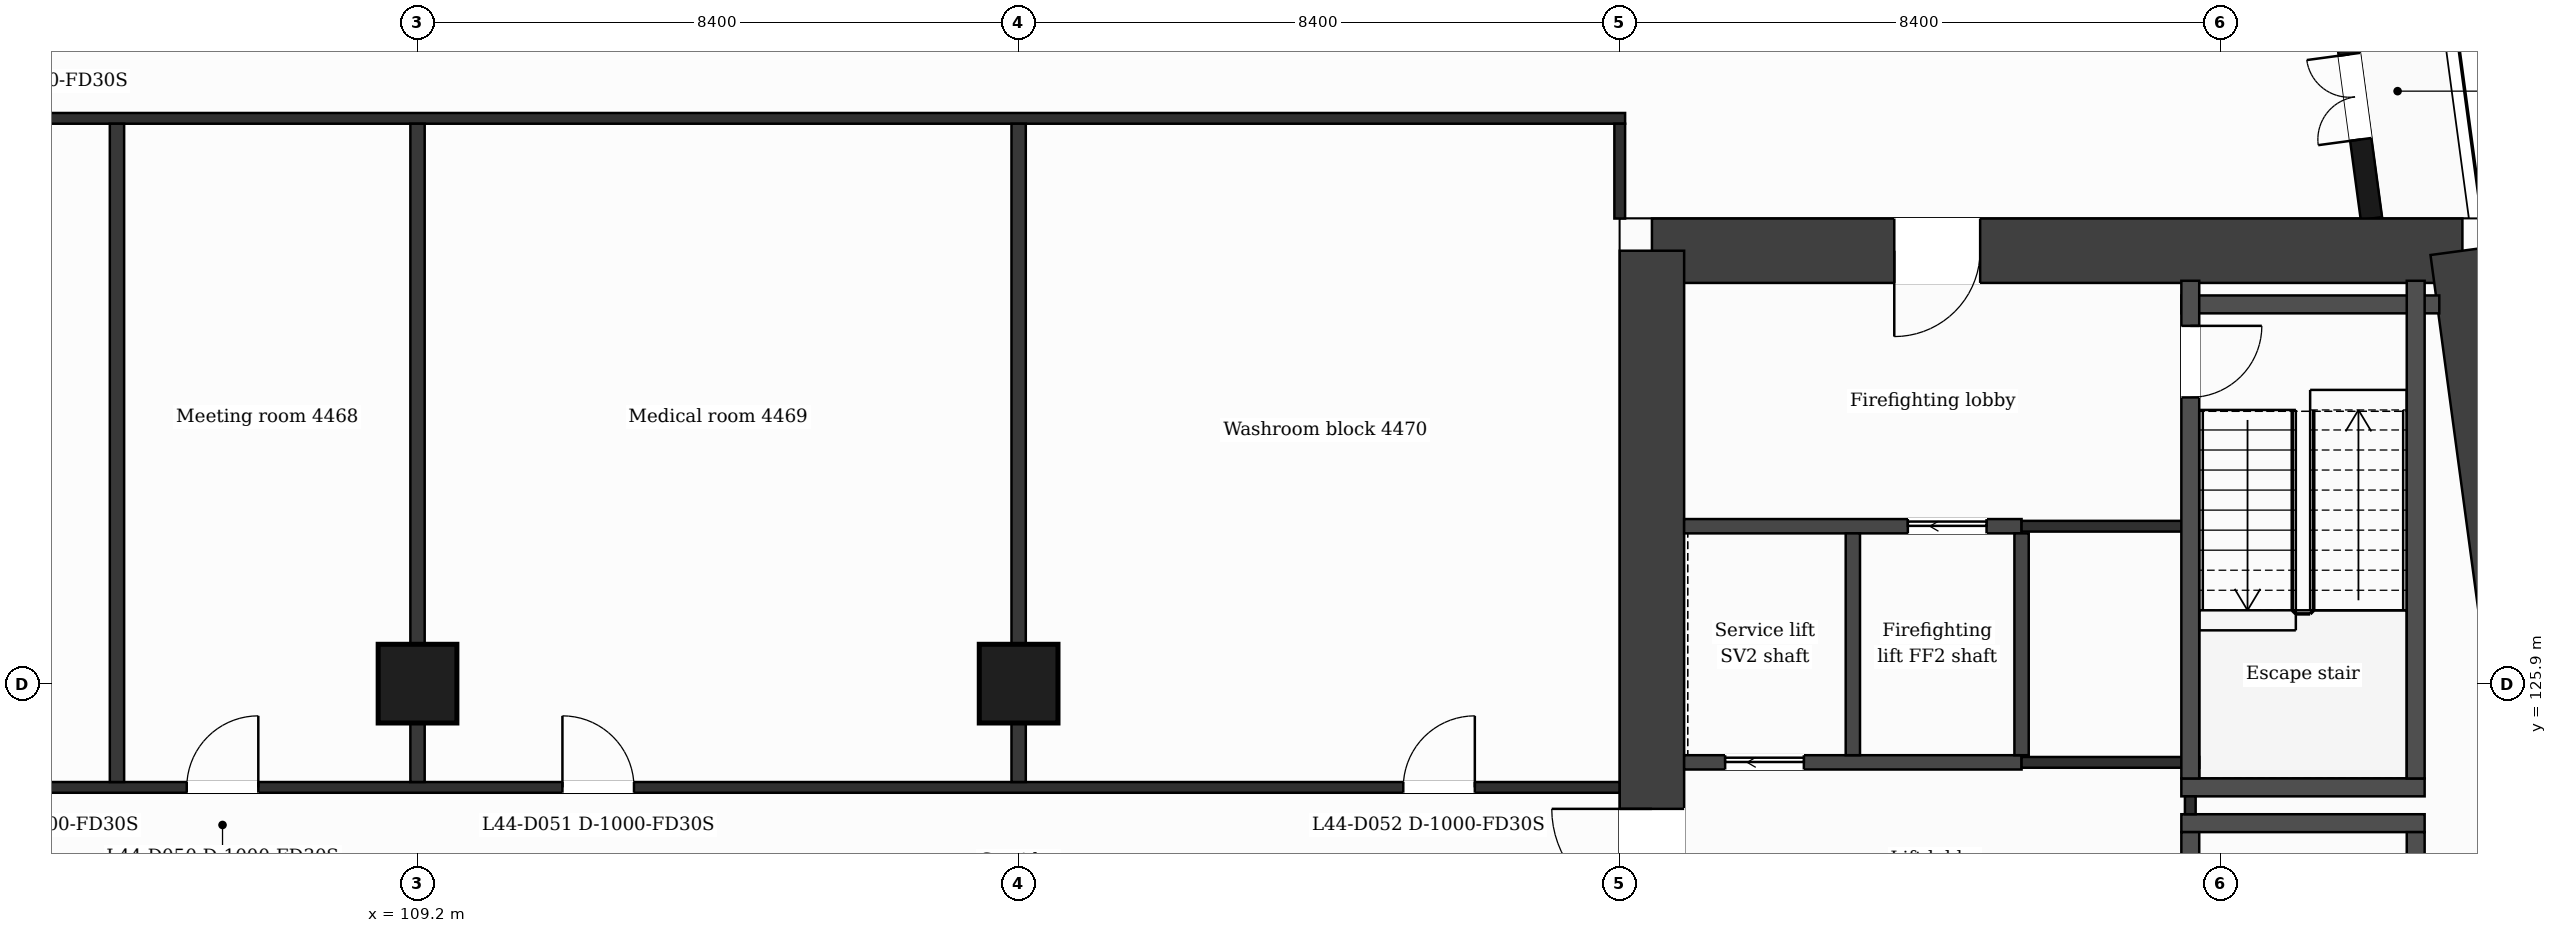
"""IFC4 building model, lengths in metres.
Left out: names, types, materials, properties, quantities, classifications, styles, units other than length and angle.
Written with IfcOpenShell. Run it as: python <this file> out.ifc"""

import sys

from ifc_helpers import new_model, si_unit, direction, frame, frame_2d, origin, origin_2d, place, context, subcontext, project, spatial, rectangle, extrude, element, fill, save


model = new_model("IFC4")
c1 = context("Model", 3, precision=1e-05, world=origin(), true_north=direction((0.0, 1.0)))
c2 = subcontext(c1, "Body", "Model", "MODEL_VIEW")
j1 = project(units=[si_unit("LENGTHUNIT", "METRE"), si_unit("PLANEANGLEUNIT", "RADIAN")], contexts=[c1])
p1 = place(None, origin())
s1 = spatial("IfcSite", under=j1, at=p1, CompositionType="ELEMENT")
p2 = place(p1, origin())
s2 = spatial("IfcBuilding", under=s1, at=p2, CompositionType="ELEMENT")
p3 = place(p2, frame((0.0, 0.0, 184.8)))
s3 = spatial("IfcBuildingStorey", under=s2, at=p3, CompositionType="ELEMENT", Elevation=184.8)
p4 = place(p3, frame((126.45, 131.95, 0.0), z_axis=(0.0, 0.0, 1.0), x_axis=(1.0, 0.0, 0.0)))
e1 = element("IfcWall", 1, at=p4, inside=s3, PredefinedType="SHEAR", context=c2, shape_type="SweptSolid", body=[
    extrude(rectangle(XDim=11.326, YDim=0.9, at=frame_2d((5.663, 0.0))), origin(), (0.0, 0.0, 1.0), 3.7),
])
p5 = place(p4, frame((3.386, 0.0, 0.0)))
e2 = element("IfcOpeningElement", 2, at=p5, cuts=e1, PredefinedType="OPENING", context=c2, shape_type="SweptSolid", body=[
    extrude(rectangle(XDim=1.2, YDim=2.1, at=frame_2d((0.6, 1.05))), frame((0.0, 0.46, 0.0), z_axis=(0.0, -1.0, 0.0), x_axis=(1.0, 0.0, 0.0)), (0.0, 0.0, 1.0), 0.92),
])
p6 = place(p3, frame((137.776, 131.95, 0.0), z_axis=(0.0, 0.0, 1.0), x_axis=(0.133421759112, -0.991059349482, 0.0)))
e3 = element("IfcWall", 3, at=p6, inside=s3, PredefinedType="SHEAR", context=c2, shape_type="SweptSolid", body=[
    extrude(rectangle(XDim=21.29, YDim=0.9, at=frame_2d((10.645, 0.0))), origin(), (0.0, 0.0, 1.0), 3.7),
])
p7 = place(p3, frame((126.45, 110.85, 0.0), z_axis=(0.0, 0.0, 1.0), x_axis=(0.0, 1.0, 0.0)))
e4 = element("IfcWall", 4, at=p7, inside=s3, PredefinedType="SHEAR", context=c2, shape_type="SweptSolid", body=[
    extrude(rectangle(XDim=21.1, YDim=0.9, at=frame_2d((10.55, 0.0))), origin(), (0.0, 0.0, 1.0), 3.7),
])
p8 = place(p7, frame((11.9, 0.0, 0.0)))
e5 = element("IfcOpeningElement", 5, at=p8, cuts=e4, PredefinedType="OPENING", context=c2, shape_type="SweptSolid", body=[
    extrude(rectangle(XDim=1.4, YDim=2.1, at=frame_2d((0.7, 1.05))), frame((0.0, 0.46, 0.0), z_axis=(0.0, -1.0, 0.0), x_axis=(1.0, 0.0, 0.0)), (0.0, 0.0, 1.0), 0.92),
])
for number, where, z_axis, x_axis in (
    (6, (109.2, 125.9, 0.0), (0.0, 0.0, 1.0), (1.0, 0.0, 0.0)),
    (7, (117.6, 125.9, 0.0), (0.0, 0.0, 1.0), (1.0, 0.0, 0.0)),
):
    element("IfcColumn", number, at=place(p3, frame(where, z_axis=z_axis, x_axis=x_axis)), inside=s3, PredefinedType="COLUMN", context=c2, shape_type="SweptSolid", body=[
        extrude(rectangle(XDim=1.1, YDim=1.1, at=origin_2d()), origin(), (0.0, 0.0, 1.0), 3.7),
    ])
p9 = place(p3, frame((136.504, 132.4, 0.0), z_axis=(0.0, 0.0, 1.0), x_axis=(-0.133399697462, 0.99106231929, 0.0)))
e8 = element("IfcWall", 8, at=p9, inside=s3, PredefinedType="SOLIDWALL", context=c2, shape_type="SweptSolid", body=[
    extrude(rectangle(XDim=6.74, YDim=0.3, at=frame_2d((3.37, 0.0))), origin(), (0.0, 0.0, 1.0), 3.38),
])
p10 = place(p9, frame((1.115, 0.0, 0.0)))
e9 = element("IfcOpeningElement", 9, at=p10, cuts=e8, PredefinedType="OPENING", context=c2, shape_type="SweptSolid", body=[
    extrude(rectangle(XDim=1.2, YDim=2.4, at=frame_2d((0.6, 1.2))), frame((0.0, 0.16, 0.0), z_axis=(0.0, -1.0, 0.0), x_axis=(1.0, 0.0, 0.0)), (0.0, 0.0, 1.0), 0.32),
])
p11 = place(p9, frame((3.835, 0.0, 0.9)))
e10 = element("IfcOpeningElement", 10, at=p11, cuts=e8, PredefinedType="OPENING", context=c2, shape_type="SweptSolid", body=[
    extrude(rectangle(XDim=2.4, YDim=2.1, at=frame_2d((1.2, 1.05))), frame((0.0, 0.16, 0.0), z_axis=(0.0, -1.0, 0.0), x_axis=(1.0, 0.0, 0.0)), (0.0, 0.0, 1.0), 0.32),
])
for number, where, z_axis, x_axis in (
    (11, (133.848, 123.95, 0.0), (0.0, 0.0, 1.0), (1.0, 0.0, 0.0)),
    (12, (133.848, 124.45, 0.0), (0.0, 0.0, 1.0), (1.0, 0.0, 0.0)),
):
    element("IfcWall", number, at=place(p3, frame(where, z_axis=z_axis, x_axis=x_axis)), inside=s3, PredefinedType="PARTITIONING", context=c2, shape_type="SweptSolid", body=[
        extrude(rectangle(XDim=3.4, YDim=0.25, at=frame_2d((1.7, 0.0))), origin(), (0.0, 0.0, 1.0), 3.38),
    ])
p12 = place(p3, frame((100.8, 124.45, 0.0), z_axis=(0.0, 0.0, 1.0), x_axis=(1.0, 0.0, 0.0)))
e13 = element("IfcWall", 13, at=p12, inside=s3, PredefinedType="PARTITIONING", context=c2, shape_type="SweptSolid", body=[
    extrude(rectangle(XDim=25.2, YDim=0.15, at=frame_2d((12.6, 0.0))), origin(), (0.0, 0.0, 1.0), 3.38),
])
p13 = place(p12, frame((0.675, 0.0, 0.0)))
e14 = element("IfcOpeningElement", 14, at=p13, cuts=e13, PredefinedType="OPENING", context=c2, shape_type="SweptSolid", body=[
    extrude(rectangle(XDim=1.0, YDim=2.1, at=frame_2d((0.5, 1.05))), frame((0.0, 0.085, 0.0), z_axis=(0.0, -1.0, 0.0), x_axis=(1.0, 0.0, 0.0)), (0.0, 0.0, 1.0), 0.17),
])
p14 = place(p12, frame((5.175, 0.0, 0.0)))
e15 = element("IfcOpeningElement", 15, at=p14, cuts=e13, PredefinedType="OPENING", context=c2, shape_type="SweptSolid", body=[
    extrude(rectangle(XDim=1.0, YDim=2.1, at=frame_2d((0.5, 1.05))), frame((0.0, 0.085, 0.0), z_axis=(0.0, -1.0, 0.0), x_axis=(1.0, 0.0, 0.0)), (0.0, 0.0, 1.0), 0.17),
])
p15 = place(p12, frame((10.425, 0.0, 0.0)))
e16 = element("IfcOpeningElement", 16, at=p15, cuts=e13, PredefinedType="OPENING", context=c2, shape_type="SweptSolid", body=[
    extrude(rectangle(XDim=1.0, YDim=2.1, at=frame_2d((0.5, 1.05))), frame((0.0, 0.085, 0.0), z_axis=(0.0, -1.0, 0.0), x_axis=(1.0, 0.0, 0.0)), (0.0, 0.0, 1.0), 0.17),
])
p16 = place(p12, frame((22.175, 0.0, 0.0)))
e17 = element("IfcOpeningElement", 17, at=p16, cuts=e13, PredefinedType="OPENING", context=c2, shape_type="SweptSolid", body=[
    extrude(rectangle(XDim=1.0, YDim=2.1, at=frame_2d((0.5, 1.05))), frame((0.0, 0.085, 0.0), z_axis=(0.0, -1.0, 0.0), x_axis=(1.0, 0.0, 0.0)), (0.0, 0.0, 1.0), 0.17),
])
p17 = place(p3, frame((126.9, 124.8, 0.0), z_axis=(0.0, 0.0, 1.0), x_axis=(1.0, 0.0, 0.0)))
e18 = element("IfcWall", 18, at=p17, inside=s3, PredefinedType="PARTITIONING", context=c2, shape_type="SweptSolid", body=[
    extrude(rectangle(XDim=4.715, YDim=0.2, at=frame_2d((2.358, 0.0))), origin(), (0.0, 0.0, 1.0), 3.38),
])
p18 = place(p17, frame((0.573, 0.0, 0.0)))
e19 = element("IfcOpeningElement", 19, at=p18, cuts=e18, PredefinedType="OPENING", context=c2, shape_type="SweptSolid", body=[
    extrude(rectangle(XDim=1.1, YDim=2.1, at=frame_2d((0.55, 1.05))), frame((0.0, 0.11, 0.0), z_axis=(0.0, -1.0, 0.0), x_axis=(1.0, 0.0, 0.0)), (0.0, 0.0, 1.0), 0.22),
])
p19 = place(p3, frame((131.615, 124.8, 0.0), z_axis=(0.0, 0.0, 1.0), x_axis=(1.0, 0.0, 0.0)))
e20 = element("IfcWall", 20, at=p19, inside=s3, PredefinedType="PARTITIONING", context=c2, shape_type="SweptSolid", body=[
    extrude(rectangle(XDim=2.483, YDim=0.15, at=frame_2d((1.241, 0.0))), origin(), (0.0, 0.0, 1.0), 3.38),
])
p20 = place(p3, frame((126.9, 128.1, 0.0), z_axis=(0.0, 0.0, 1.0), x_axis=(1.0, 0.0, 0.0)))
e21 = element("IfcWall", 21, at=p20, inside=s3, PredefinedType="PARTITIONING", context=c2, shape_type="SweptSolid", body=[
    extrude(rectangle(XDim=4.715, YDim=0.2, at=frame_2d((2.358, 0.0))), origin(), (0.0, 0.0, 1.0), 3.38),
])
p21 = place(p20, frame((3.126, 0.0, 0.0)))
e22 = element("IfcOpeningElement", 22, at=p21, cuts=e21, PredefinedType="OPENING", context=c2, shape_type="SweptSolid", body=[
    extrude(rectangle(XDim=1.1, YDim=2.1, at=frame_2d((0.55, 1.05))), frame((0.0, 0.11, 0.0), z_axis=(0.0, -1.0, 0.0), x_axis=(1.0, 0.0, 0.0)), (0.0, 0.0, 1.0), 0.22),
])
p22 = place(p3, frame((131.615, 128.1, 0.0), z_axis=(0.0, 0.0, 1.0), x_axis=(1.0, 0.0, 0.0)))
e23 = element("IfcWall", 23, at=p22, inside=s3, PredefinedType="PARTITIONING", context=c2, shape_type="SweptSolid", body=[
    extrude(rectangle(XDim=2.358, YDim=0.15, at=frame_2d((1.179, 0.0))), origin(), (0.0, 0.0, 1.0), 3.38),
])
p23 = place(p3, frame((133.848, 131.2, 0.0), z_axis=(0.0, 0.0, 1.0), x_axis=(1.0, 0.0, 0.0)))
e24 = element("IfcWall", 24, at=p23, inside=s3, PredefinedType="PARTITIONING", context=c2, shape_type="SweptSolid", body=[
    extrude(rectangle(XDim=3.605, YDim=0.25, at=frame_2d((1.802, 0.0))), origin(), (0.0, 0.0, 1.0), 3.38),
])
p24 = place(p3, frame((100.725, 133.8, 0.0), z_axis=(0.0, 0.0, 1.0), x_axis=(1.0, 0.0, 0.0)))
e25 = element("IfcWall", 25, at=p24, inside=s3, PredefinedType="PARTITIONING", context=c2, shape_type="SweptSolid", body=[
    extrude(rectangle(XDim=25.35, YDim=0.15, at=frame_2d((12.675, 0.0))), origin(), (0.0, 0.0, 1.0), 3.38),
])
p25 = place(p24, frame((2.3, 0.0, 0.0)))
e26 = element("IfcOpeningElement", 26, at=p25, cuts=e25, PredefinedType="OPENING", context=c2, shape_type="SweptSolid", body=[
    extrude(rectangle(XDim=1.0, YDim=2.1, at=frame_2d((0.5, 1.05))), frame((0.0, 0.085, 0.0), z_axis=(0.0, -1.0, 0.0), x_axis=(1.0, 0.0, 0.0)), (0.0, 0.0, 1.0), 0.17),
])
for number, where, z_axis, x_axis in (
    (27, (105.0, 124.525, 0.0), (0.0, 0.0, 1.0), (0.0, 1.0, 0.0)),
    (28, (109.2, 124.525, 0.0), (0.0, 0.0, 1.0), (0.0, 1.0, 0.0)),
    (29, (117.6, 124.525, 0.0), (0.0, 0.0, 1.0), (0.0, 1.0, 0.0)),
):
    element("IfcWall", number, at=place(p3, frame(where, z_axis=z_axis, x_axis=x_axis)), inside=s3, PredefinedType="PARTITIONING", context=c2, shape_type="SweptSolid", body=[
        extrude(rectangle(XDim=9.2, YDim=0.2, at=frame_2d((4.6, 0.0))), origin(), (0.0, 0.0, 1.0), 3.38),
    ])
p26 = place(p3, frame((126.0, 132.4, 0.0), z_axis=(0.0, 0.0, 1.0), x_axis=(0.0, 1.0, 0.0)))
e30 = element("IfcWall", 30, at=p26, inside=s3, PredefinedType="PARTITIONING", context=c2, shape_type="SweptSolid", body=[
    extrude(rectangle(XDim=1.325, YDim=0.15, at=frame_2d((0.663, 0.0))), origin(), (0.0, 0.0, 1.0), 3.38),
])
for number, where, z_axis, x_axis in (
    (31, (129.258, 124.9, 0.0), (0.0, 0.0, 1.0), (0.0, 1.0, 0.0)),
    (32, (131.615, 124.9, 0.0), (0.0, 0.0, 1.0), (0.0, 1.0, 0.0)),
):
    element("IfcWall", number, at=place(p3, frame(where, z_axis=z_axis, x_axis=x_axis)), inside=s3, PredefinedType="PARTITIONING", context=c2, shape_type="SweptSolid", body=[
        extrude(rectangle(XDim=3.1, YDim=0.2, at=frame_2d((1.55, 0.0))), origin(), (0.0, 0.0, 1.0), 3.38),
    ])
p27 = place(p3, frame((133.973, 124.075, 0.0), z_axis=(0.0, 0.0, 1.0), x_axis=(0.0, 1.0, 0.0)))
e33 = element("IfcWall", 33, at=p27, inside=s3, PredefinedType="PARTITIONING", context=c2, shape_type="SweptSolid", body=[
    extrude(rectangle(XDim=0.25, YDim=0.15, at=frame_2d((0.125, 0.0))), origin(), (0.0, 0.0, 1.0), 3.38),
])
p28 = place(p3, frame((133.973, 116.87, 0.0), z_axis=(0.0, 0.0, 1.0), x_axis=(0.0, 1.0, 0.0)))
e34 = element("IfcWall", 34, at=p28, inside=s3, PredefinedType="PARTITIONING", context=c2, shape_type="SweptSolid", body=[
    extrude(rectangle(XDim=6.955, YDim=0.25, at=frame_2d((3.478, 0.0))), origin(), (0.0, 0.0, 1.0), 3.38),
])
p29 = place(p28, frame((5.655, 0.0, 0.0)))
e35 = element("IfcOpeningElement", 35, at=p29, cuts=e34, PredefinedType="OPENING", context=c2, shape_type="SweptSolid", body=[
    extrude(rectangle(XDim=0.95, YDim=2.1, at=frame_2d((0.475, 1.05))), frame((0.0, 0.135, 0.0), z_axis=(0.0, -1.0, 0.0), x_axis=(1.0, 0.0, 0.0)), (0.0, 0.0, 1.0), 0.27),
])
p30 = place(p3, frame((133.973, 124.575, 0.0), z_axis=(0.0, 0.0, 1.0), x_axis=(0.0, 1.0, 0.0)))
e36 = element("IfcWall", 36, at=p30, inside=s3, PredefinedType="PARTITIONING", context=c2, shape_type="SweptSolid", body=[
    extrude(rectangle(XDim=6.955, YDim=0.25, at=frame_2d((3.478, 0.0))), origin(), (0.0, 0.0, 1.0), 3.38),
])
p31 = place(p30, frame((5.325, 0.0, 0.0)))
e37 = element("IfcOpeningElement", 37, at=p31, cuts=e36, PredefinedType="OPENING", context=c2, shape_type="SweptSolid", body=[
    extrude(rectangle(XDim=1.0, YDim=2.1, at=frame_2d((0.5, 1.05))), frame((0.0, 0.135, 0.0), z_axis=(0.0, -1.0, 0.0), x_axis=(1.0, 0.0, 0.0)), (0.0, 0.0, 1.0), 0.27),
])
p32 = place(p3, frame((137.123, 116.87, 0.0), z_axis=(0.0, 0.0, 1.0), x_axis=(0.0, 1.0, 0.0)))
e38 = element("IfcWall", 38, at=p32, inside=s3, PredefinedType="PARTITIONING", context=c2, shape_type="SweptSolid", body=[
    extrude(rectangle(XDim=6.955, YDim=0.25, at=frame_2d((3.478, 0.0))), origin(), (0.0, 0.0, 1.0), 3.38),
])
p33 = place(p3, frame((137.123, 124.575, 0.0), z_axis=(0.0, 0.0, 1.0), x_axis=(0.0, 1.0, 0.0)))
e39 = element("IfcWall", 39, at=p33, inside=s3, PredefinedType="PARTITIONING", context=c2, shape_type="SweptSolid", body=[
    extrude(rectangle(XDim=6.955, YDim=0.25, at=frame_2d((3.478, 0.0))), origin(), (0.0, 0.0, 1.0), 3.38),
])
p34 = place(p10, origin())
e40 = element("IfcDoor", 40, at=p34, inside=s3, OperationType="DOUBLE_DOOR_SINGLE_SWING", PredefinedType="DOOR", context=c2, shape_type="SweptSolid", body=[
    extrude(rectangle(XDim=1.2, YDim=2.4, at=frame_2d((0.6, 1.2))), frame((0.0, 0.025, 0.0), z_axis=(0.0, -1.0, 0.0), x_axis=(1.0, 0.0, 0.0)), (0.0, 0.0, 1.0), 0.05),
])
fill(e9, e40)
p35 = place(p21, origin())
e41 = element("IfcDoor", 41, at=p35, inside=s3, OperationType="SLIDING_TO_LEFT", PredefinedType="DOOR", context=c2, shape_type="SweptSolid", body=[
    extrude(rectangle(XDim=1.1, YDim=2.1, at=frame_2d((0.55, 1.05))), frame((0.0, 0.025, 0.0), z_axis=(0.0, -1.0, 0.0), x_axis=(1.0, 0.0, 0.0)), (0.0, 0.0, 1.0), 0.05),
])
fill(e22, e41)
p36 = place(p18, origin())
e42 = element("IfcDoor", 42, at=p36, inside=s3, OperationType="SLIDING_TO_LEFT", PredefinedType="DOOR", context=c2, shape_type="SweptSolid", body=[
    extrude(rectangle(XDim=1.1, YDim=2.1, at=frame_2d((0.55, 1.05))), frame((0.0, 0.025, 0.0), z_axis=(0.0, -1.0, 0.0), x_axis=(1.0, 0.0, 0.0)), (0.0, 0.0, 1.0), 0.05),
])
fill(e19, e42)
p37 = place(p31, origin())
e43 = element("IfcDoor", 43, at=p37, inside=s3, OperationType="SINGLE_SWING_RIGHT", PredefinedType="DOOR", context=c2, shape_type="SweptSolid", body=[
    extrude(rectangle(XDim=1.0, YDim=2.1, at=frame_2d((0.5, 1.05))), frame((0.0, 0.025, 0.0), z_axis=(0.0, -1.0, 0.0), x_axis=(1.0, 0.0, 0.0)), (0.0, 0.0, 1.0), 0.05),
])
fill(e37, e43)
p38 = place(p14, origin())
e44 = element("IfcDoor", 44, at=p38, inside=s3, OperationType="SINGLE_SWING_RIGHT", PredefinedType="DOOR", context=c2, shape_type="SweptSolid", body=[
    extrude(rectangle(XDim=1.0, YDim=2.1, at=frame_2d((0.5, 1.05))), frame((0.0, 0.025, 0.0), z_axis=(0.0, -1.0, 0.0), x_axis=(1.0, 0.0, 0.0)), (0.0, 0.0, 1.0), 0.05),
])
fill(e15, e44)
p39 = place(p15, origin())
e45 = element("IfcDoor", 45, at=p39, inside=s3, OperationType="SINGLE_SWING_LEFT", PredefinedType="DOOR", context=c2, shape_type="SweptSolid", body=[
    extrude(rectangle(XDim=1.0, YDim=2.1, at=frame_2d((0.5, 1.05))), frame((0.0, 0.025, 0.0), z_axis=(0.0, -1.0, 0.0), x_axis=(1.0, 0.0, 0.0)), (0.0, 0.0, 1.0), 0.05),
])
fill(e16, e45)
p40 = place(p16, origin())
e46 = element("IfcDoor", 46, at=p40, inside=s3, OperationType="SINGLE_SWING_RIGHT", PredefinedType="DOOR", context=c2, shape_type="SweptSolid", body=[
    extrude(rectangle(XDim=1.0, YDim=2.1, at=frame_2d((0.5, 1.05))), frame((0.0, 0.025, 0.0), z_axis=(0.0, -1.0, 0.0), x_axis=(1.0, 0.0, 0.0)), (0.0, 0.0, 1.0), 0.05),
])
fill(e17, e46)
p41 = place(p5, origin())
e47 = element("IfcDoor", 47, at=p41, inside=s3, OperationType="SINGLE_SWING_LEFT", PredefinedType="DOOR", context=c2, shape_type="SweptSolid", body=[
    extrude(rectangle(XDim=1.2, YDim=2.1, at=frame_2d((0.6, 1.05))), frame((0.0, 0.025, 0.0), z_axis=(0.0, -1.0, 0.0), x_axis=(1.0, 0.0, 0.0)), (0.0, 0.0, 1.0), 0.05),
])
fill(e2, e47)
p42 = place(p8, origin())
e48 = element("IfcDoor", 48, at=p42, inside=s3, OperationType="SINGLE_SWING_RIGHT", PredefinedType="DOOR", context=c2, shape_type="SweptSolid", body=[
    extrude(rectangle(XDim=1.4, YDim=2.1, at=frame_2d((0.7, 1.05))), frame((0.0, 0.025, 0.0), z_axis=(0.0, -1.0, 0.0), x_axis=(1.0, 0.0, 0.0)), (0.0, 0.0, 1.0), 0.05),
])
fill(e5, e48)
save(model, sys.argv[1])
